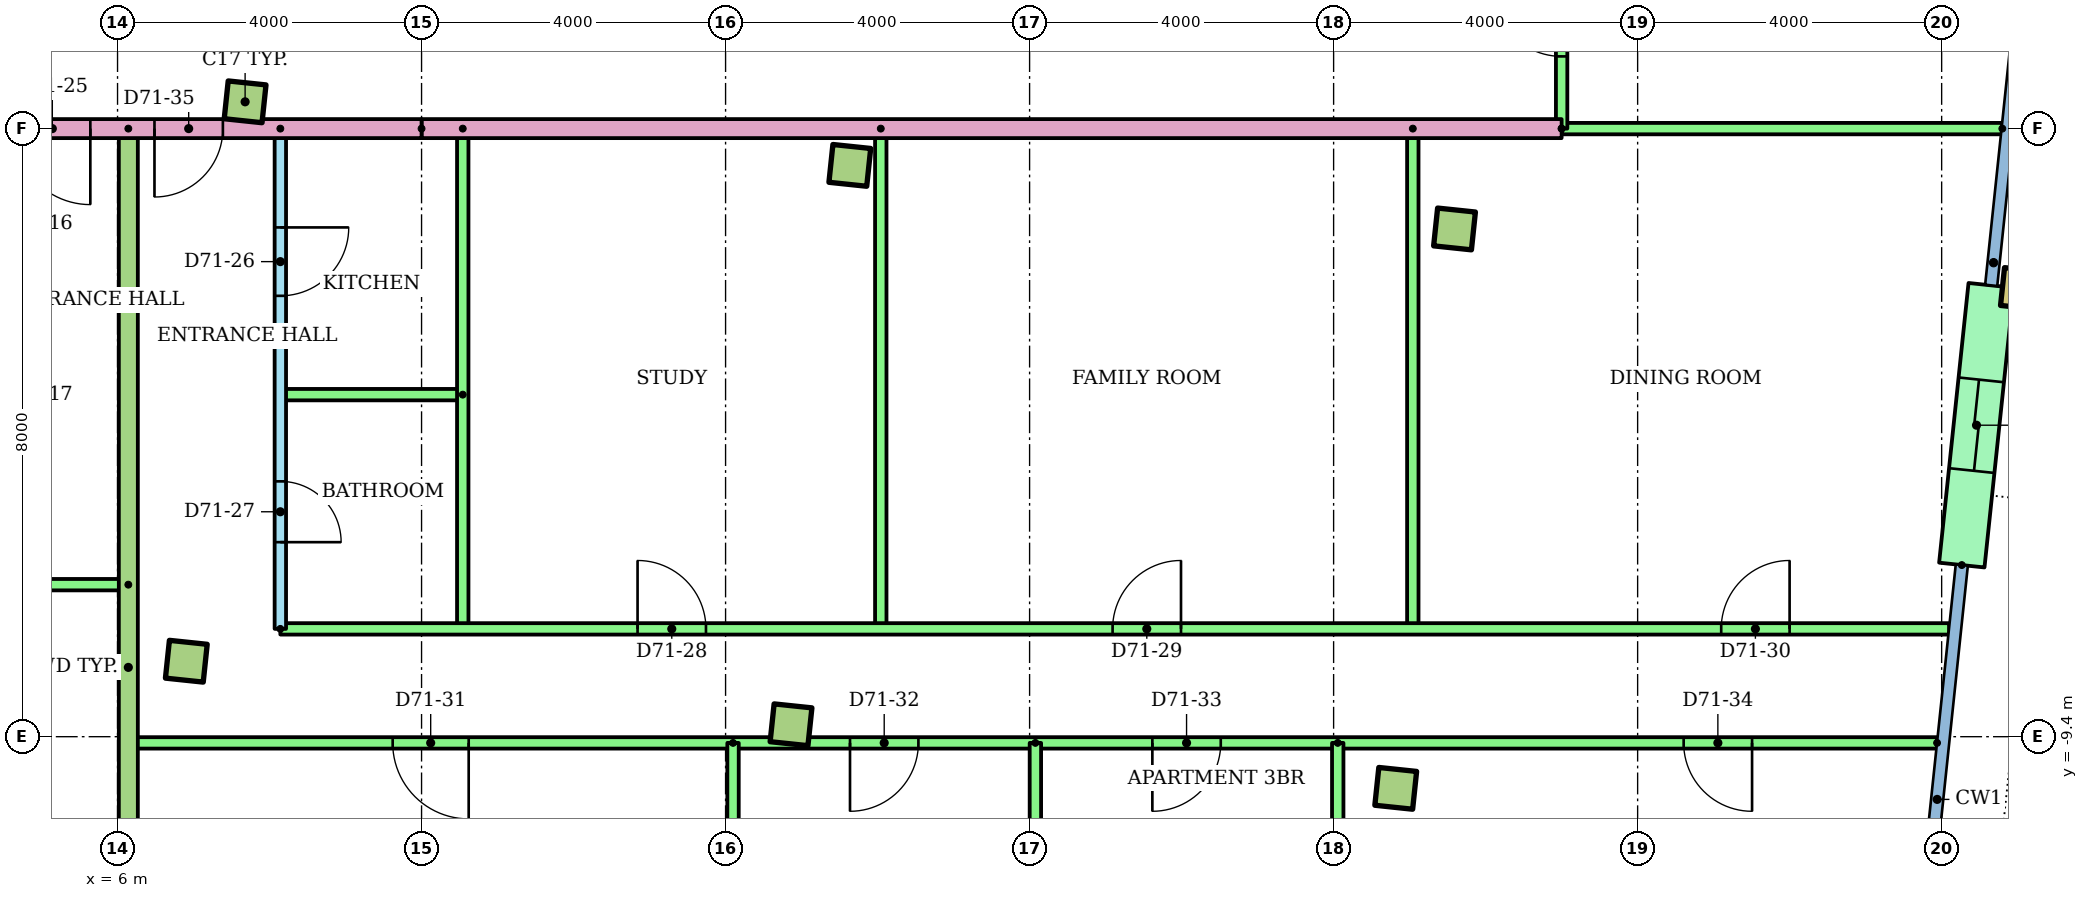
"""IFC4 building model, lengths in metres.
Left out: names, types, materials, properties, quantities, classifications, styles, units other than length and angle.
Written with IfcOpenShell. Run it as: python <this file> out.ifc"""

import sys

from ifc_helpers import new_model, si_unit, direction, frame, frame_2d, origin, origin_2d, place, context, subcontext, project, spatial, rectangle, hollow_rectangle, extrude, element, fill, save


model = new_model("IFC4")
c1 = context("Model", 3, precision=1e-05, world=origin(), true_north=direction((0.0, 1.0)))
c2 = subcontext(c1, "Body", "Model", "MODEL_VIEW")
j1 = project(units=[si_unit("LENGTHUNIT", "METRE"), si_unit("PLANEANGLEUNIT", "RADIAN")], contexts=[c1])
p1 = place(None, origin())
s1 = spatial("IfcSite", under=j1, at=p1, CompositionType="ELEMENT")
p2 = place(p1, origin())
s2 = spatial("IfcBuilding", under=s1, at=p2, CompositionType="ELEMENT")
p3 = place(p2, frame((0.0, 0.0, 272.3)))
s3 = spatial("IfcBuildingStorey", under=s2, at=p3, CompositionType="ELEMENT", Elevation=272.3)
for number, where, z_axis, x_axis in (
    (1, (6.905, -8.407, 0.0), (0.0, 0.0, 1.0), (0.995, -0.105, 0.0)),
    (2, (14.861, -9.243, 0.0), (0.0, 0.0, 1.0), (0.995, -0.105, 0.0)),
    (3, (22.817, -10.08, 0.0), (0.0, 0.0, 1.0), (0.995, -0.105, 0.0)),
    (4, (7.678, -1.048, 0.0), (0.0, 0.0, 1.0), (0.995, -0.105, 0.0)),
    (5, (15.635, -1.884, 0.0), (0.0, 0.0, 1.0), (0.995, -0.105, 0.0)),
    (6, (23.591, -2.72, 0.0), (0.0, 0.0, 1.0), (0.995, -0.105, 0.0)),
):
    element("IfcColumn", number, at=place(p3, frame(where, z_axis=z_axis, x_axis=x_axis)), inside=s3, PredefinedType="COLUMN", context=c2, shape_type="SweptSolid", body=[
        extrude(rectangle(XDim=0.5, YDim=0.5, at=origin_2d()), origin(), (0.0, 0.0, 1.0), 3.2),
    ])
p4 = place(p3, frame((31.05, -3.504, 0.0), z_axis=(0.0, 0.0, 1.0), x_axis=(0.994521895368, -0.104528463268, 0.0)))
e7 = element("IfcColumn", 7, at=p4, inside=s3, PredefinedType="COLUMN", context=c2, shape_type="SweptSolid", body=[
    extrude(hollow_rectangle(XDim=0.5, YDim=0.5, WallThickness=0.025, at=origin_2d()), origin(), (0.0, 0.0, 1.0), 3.2),
])
p5 = place(p3, frame((30.265, -7.142, 0.0), z_axis=(0.0, 0.0, 1.0), x_axis=(0.104513052986, 0.994523514933, 0.0)))
e8 = element("IfcWall", 8, at=p5, inside=s3, PredefinedType="STANDARD", context=c2, shape_type="SweptSolid", body=[
    extrude(rectangle(XDim=3.7, YDim=0.6, at=frame_2d((1.85, 0.0))), origin(), (0.0, 0.0, 1.0), 2.92),
])
p6 = place(p5, frame((1.25, 0.0, 0.0)))
e9 = element("IfcOpeningElement", 9, at=p6, cuts=e8, PredefinedType="OPENING", context=c2, shape_type="SweptSolid", body=[
    extrude(rectangle(XDim=1.2, YDim=2.1, at=frame_2d((0.6, 1.05))), frame((0.0, 0.31, 0.0), z_axis=(0.0, -1.0, 0.0), x_axis=(1.0, 0.0, 0.0)), (0.0, 0.0, 1.0), 0.62),
])
p7 = place(p3, frame((6.142, -7.4, 0.0), z_axis=(0.0, 0.0, 1.0), x_axis=(-1.0, 0.0, 0.0)))
e10 = element("IfcWall", 10, at=p7, inside=s3, PredefinedType="PARTITIONING", context=c2, shape_type="SweptSolid", body=[
    extrude(rectangle(XDim=15.912, YDim=0.15, at=frame_2d((7.956, 0.0))), origin(), (0.0, 0.0, 1.0), 2.4),
])
p8 = place(p7, frame((12.252, 0.0, 0.0)))
e11 = element("IfcOpeningElement", 11, at=p8, cuts=e10, PredefinedType="OPENING", context=c2, shape_type="SweptSolid", body=[
    extrude(rectangle(XDim=0.9, YDim=2.1, at=frame_2d((0.45, 1.05))), frame((0.0, 0.085, 0.0), z_axis=(0.0, -1.0, 0.0), x_axis=(1.0, 0.0, 0.0)), (0.0, 0.0, 1.0), 0.17),
])
p9 = place(p7, frame((9.495, 0.0, 0.0)))
e12 = element("IfcOpeningElement", 12, at=p9, cuts=e10, PredefinedType="OPENING", context=c2, shape_type="SweptSolid", body=[
    extrude(rectangle(XDim=0.9, YDim=2.1, at=frame_2d((0.45, 1.05))), frame((0.0, 0.085, 0.0), z_axis=(0.0, -1.0, 0.0), x_axis=(1.0, 0.0, 0.0)), (0.0, 0.0, 1.0), 0.17),
])
p10 = place(p7, frame((3.478, 0.0, 0.0)))
e13 = element("IfcOpeningElement", 13, at=p10, cuts=e10, PredefinedType="OPENING", context=c2, shape_type="SweptSolid", body=[
    extrude(rectangle(XDim=1.0, YDim=2.1, at=frame_2d((0.5, 1.05))), frame((0.0, 0.085, 0.0), z_axis=(0.0, -1.0, 0.0), x_axis=(1.0, 0.0, 0.0)), (0.0, 0.0, 1.0), 0.17),
])
p11 = place(p3, frame((8.142, -1.4, 0.0), z_axis=(0.0, 0.0, 1.0), x_axis=(0.0, -1.0, 0.0)))
e14 = element("IfcWall", 14, at=p11, inside=s3, PredefinedType="PARTITIONING", context=c2, shape_type="SweptSolid", body=[
    extrude(rectangle(XDim=6.582, YDim=0.15, at=frame_2d((3.291, 0.0))), origin(), (0.0, 0.0, 1.0), 2.4),
])
p12 = place(p11, frame((1.3, 0.0, 0.0)))
e15 = element("IfcOpeningElement", 15, at=p12, cuts=e14, PredefinedType="OPENING", context=c2, shape_type="SweptSolid", body=[
    extrude(rectangle(XDim=0.9, YDim=2.1, at=frame_2d((0.45, 1.05))), frame((0.0, 0.085, 0.0), z_axis=(0.0, -1.0, 0.0), x_axis=(1.0, 0.0, 0.0)), (0.0, 0.0, 1.0), 0.17),
])
p13 = place(p11, frame((4.641, 0.0, 0.0)))
e16 = element("IfcOpeningElement", 16, at=p13, cuts=e14, PredefinedType="OPENING", context=c2, shape_type="SweptSolid", body=[
    extrude(rectangle(XDim=0.8, YDim=2.1, at=frame_2d((0.4, 1.05))), frame((0.0, 0.085, 0.0), z_axis=(0.0, -1.0, 0.0), x_axis=(1.0, 0.0, 0.0)), (0.0, 0.0, 1.0), 0.17),
])
p14 = place(p3, frame((10.542, -4.9, 0.0), z_axis=(0.0, 0.0, 1.0), x_axis=(-1.0, 0.0, 0.0)))
e17 = element("IfcWall", 17, at=p14, inside=s3, PredefinedType="PARTITIONING", context=c2, shape_type="SweptSolid", body=[
    extrude(rectangle(XDim=2.4, YDim=0.15, at=frame_2d((1.2, 0.0))), origin(), (0.0, 0.0, 1.0), 2.4),
])
for number, where, z_axis, x_axis in (
    (18, (10.542, -1.4, 0.0), (0.0, 0.0, 1.0), (0.0, -1.0, 0.0)),
    (19, (16.042, -1.4, 0.0), (0.0, 0.0, 1.0), (0.0, -1.0, 0.0)),
    (20, (23.042, -1.4, 0.0), (0.0, 0.0, 1.0), (0.0, -1.0, 0.0)),
):
    element("IfcWall", number, at=place(p3, frame(where, z_axis=z_axis, x_axis=x_axis)), inside=s3, PredefinedType="PARTITIONING", context=c2, shape_type="SweptSolid", body=[
        extrude(rectangle(XDim=6.582, YDim=0.15, at=frame_2d((3.291, 0.0))), origin(), (0.0, 0.0, 1.0), 2.4),
    ])
p15 = place(p3, frame((8.142, -7.982, 0.0)))
e21 = element("IfcWall", 21, at=p15, inside=s3, PredefinedType="PARTITIONING", context=c2, shape_type="SweptSolid", body=[
    extrude(rectangle(XDim=21.955, YDim=0.15, at=frame_2d((10.978, 0.0))), origin(), (0.0, 0.0, 1.0), 2.4),
])
p16 = place(p15, frame((4.7, 0.0, 0.0)))
e22 = element("IfcOpeningElement", 22, at=p16, cuts=e21, PredefinedType="OPENING", context=c2, shape_type="SweptSolid", body=[
    extrude(rectangle(XDim=0.9, YDim=2.1, at=frame_2d((0.45, 1.05))), frame((0.0, 0.085, 0.0), z_axis=(0.0, -1.0, 0.0), x_axis=(1.0, 0.0, 0.0)), (0.0, 0.0, 1.0), 0.17),
])
p17 = place(p15, frame((10.95, 0.0, 0.0)))
e23 = element("IfcOpeningElement", 23, at=p17, cuts=e21, PredefinedType="OPENING", context=c2, shape_type="SweptSolid", body=[
    extrude(rectangle(XDim=0.9, YDim=2.1, at=frame_2d((0.45, 1.05))), frame((0.0, 0.085, 0.0), z_axis=(0.0, -1.0, 0.0), x_axis=(1.0, 0.0, 0.0)), (0.0, 0.0, 1.0), 0.17),
])
p18 = place(p15, frame((18.958, 0.0, 0.0)))
e24 = element("IfcOpeningElement", 24, at=p18, cuts=e21, PredefinedType="OPENING", context=c2, shape_type="SweptSolid", body=[
    extrude(rectangle(XDim=0.9, YDim=2.1, at=frame_2d((0.45, 1.05))), frame((0.0, 0.085, 0.0), z_axis=(0.0, -1.0, 0.0), x_axis=(1.0, 0.0, 0.0)), (0.0, 0.0, 1.0), 0.17),
])
p19 = place(p3, frame((29.94, -9.482, 0.0), z_axis=(0.0, 0.0, 1.0), x_axis=(-1.0, 0.0, 0.0)))
e25 = element("IfcWall", 25, at=p19, inside=s3, PredefinedType="PARTITIONING", context=c2, shape_type="SweptSolid", body=[
    extrude(rectangle(XDim=23.798, YDim=0.15, at=frame_2d((11.899, 0.0))), origin(), (0.0, 0.0, 1.0), 2.4),
])
p20 = place(p19, frame((19.32, 0.0, 0.0)))
e26 = element("IfcOpeningElement", 26, at=p20, cuts=e25, PredefinedType="OPENING", context=c2, shape_type="SweptSolid", body=[
    extrude(rectangle(XDim=1.0, YDim=2.1, at=frame_2d((0.5, 1.05))), frame((0.0, 0.085, 0.0), z_axis=(0.0, -1.0, 0.0), x_axis=(1.0, 0.0, 0.0)), (0.0, 0.0, 1.0), 0.17),
])
p21 = place(p19, frame((13.403, 0.0, 0.0)))
e27 = element("IfcOpeningElement", 27, at=p21, cuts=e25, PredefinedType="OPENING", context=c2, shape_type="SweptSolid", body=[
    extrude(rectangle(XDim=0.9, YDim=2.1, at=frame_2d((0.45, 1.05))), frame((0.0, 0.085, 0.0), z_axis=(0.0, -1.0, 0.0), x_axis=(1.0, 0.0, 0.0)), (0.0, 0.0, 1.0), 0.17),
])
p22 = place(p19, frame((9.425, 0.0, 0.0)))
e28 = element("IfcOpeningElement", 28, at=p22, cuts=e25, PredefinedType="OPENING", context=c2, shape_type="SweptSolid", body=[
    extrude(rectangle(XDim=0.9, YDim=2.1, at=frame_2d((0.45, 1.05))), frame((0.0, 0.085, 0.0), z_axis=(0.0, -1.0, 0.0), x_axis=(1.0, 0.0, 0.0)), (0.0, 0.0, 1.0), 0.17),
])
p23 = place(p19, frame((2.434, 0.0, 0.0)))
e29 = element("IfcOpeningElement", 29, at=p23, cuts=e25, PredefinedType="OPENING", context=c2, shape_type="SweptSolid", body=[
    extrude(rectangle(XDim=0.9, YDim=2.1, at=frame_2d((0.45, 1.05))), frame((0.0, 0.085, 0.0), z_axis=(0.0, -1.0, 0.0), x_axis=(1.0, 0.0, 0.0)), (0.0, 0.0, 1.0), 0.17),
])
p24 = place(p3, frame((14.098, -9.482, 0.0), z_axis=(0.0, 0.0, 1.0), x_axis=(0.0, -1.0, 0.0)))
e30 = element("IfcWall", 30, at=p24, inside=s3, PredefinedType="PARTITIONING", context=c2, shape_type="SweptSolid", body=[
    extrude(rectangle(XDim=6.931, YDim=0.15, at=frame_2d((3.466, 0.0))), origin(), (0.0, 0.0, 1.0), 2.4),
])
p25 = place(p3, frame((18.076, -9.482, 0.0), z_axis=(0.0, 0.0, 1.0), x_axis=(0.0, -1.0, 0.0)))
e31 = element("IfcWall", 31, at=p25, inside=s3, PredefinedType="PARTITIONING", context=c2, shape_type="SweptSolid", body=[
    extrude(rectangle(XDim=7.36, YDim=0.15, at=frame_2d((3.68, 0.0))), origin(), (0.0, 0.0, 1.0), 2.4),
])
p26 = place(p3, frame((22.054, -9.482, 0.0), z_axis=(0.0, 0.0, 1.0), x_axis=(0.0, -1.0, 0.0)))
e32 = element("IfcWall", 32, at=p26, inside=s3, PredefinedType="PARTITIONING", context=c2, shape_type="SweptSolid", body=[
    extrude(rectangle(XDim=7.767, YDim=0.15, at=frame_2d((3.884, 0.0))), origin(), (0.0, 0.0, 1.0), 2.4),
])
p27 = place(p3, frame((6.142, -1.4, 0.0), z_axis=(0.0, 0.0, 1.0), x_axis=(0.0, -1.0, 0.0)))
e33 = element("IfcWall", 33, at=p27, inside=s3, PredefinedType="PARTITIONING", context=c2, shape_type="SweptSolid", body=[
    extrude(rectangle(XDim=14.177, YDim=0.25, at=frame_2d((7.088, 0.0))), origin(), (0.0, 0.0, 1.0), 2.4),
])
p28 = place(p3, frame((25.0, -1.4, 0.0), z_axis=(0.0, 0.0, 1.0), x_axis=(-1.0, 0.0, 0.0)))
e34 = element("IfcWall", 34, at=p28, inside=s3, PredefinedType="PARTITIONING", context=c2, shape_type="SweptSolid", body=[
    extrude(rectangle(XDim=15.0, YDim=0.25, at=frame_2d((7.5, 0.0))), origin(), (0.0, 0.0, 1.0), 2.4),
])
p29 = place(p3, frame((30.798, -1.4, 0.0), z_axis=(0.0, 0.0, 1.0), x_axis=(-1.0, 0.0, 0.0)))
e35 = element("IfcWall", 35, at=p29, inside=s3, PredefinedType="PARTITIONING", context=c2, shape_type="SweptSolid", body=[
    extrude(rectangle(XDim=5.798, YDim=0.15, at=frame_2d((2.899, 0.0))), origin(), (0.0, 0.0, 1.0), 2.4),
])
p30 = place(p3, frame((25.0, -1.4, 0.0), z_axis=(0.0, 0.0, 1.0), x_axis=(0.0, 1.0, 0.0)))
e36 = element("IfcWall", 36, at=p30, inside=s3, PredefinedType="PARTITIONING", context=c2, shape_type="SweptSolid", body=[
    extrude(rectangle(XDim=2.8, YDim=0.15, at=frame_2d((1.4, 0.0))), origin(), (0.0, 0.0, 1.0), 2.4),
])
p31 = place(p30, frame((0.95, 0.0, 0.0)))
e37 = element("IfcOpeningElement", 37, at=p31, cuts=e36, PredefinedType="OPENING", context=c2, shape_type="SweptSolid", body=[
    extrude(rectangle(XDim=0.9, YDim=2.1, at=frame_2d((0.45, 1.05))), frame((0.0, 0.085, 0.0), z_axis=(0.0, -1.0, 0.0), x_axis=(1.0, 0.0, 0.0)), (0.0, 0.0, 1.0), 0.17),
])
p32 = place(p3, frame((10.0, -1.4, 0.0), z_axis=(0.0, 0.0, 1.0), x_axis=(-1.0, 0.0, 0.0)))
e38 = element("IfcWall", 38, at=p32, inside=s3, PredefinedType="PARTITIONING", context=c2, shape_type="SweptSolid", body=[
    extrude(rectangle(XDim=20.0, YDim=0.25, at=frame_2d((10.0, 0.0))), origin(), (0.0, 0.0, 1.0), 2.4),
])
p33 = place(p32, frame((4.358, 0.0, 0.0)))
e39 = element("IfcOpeningElement", 39, at=p33, cuts=e38, PredefinedType="OPENING", context=c2, shape_type="SweptSolid", body=[
    extrude(rectangle(XDim=1.0, YDim=2.1, at=frame_2d((0.5, 1.05))), frame((0.0, 0.135, 0.0), z_axis=(0.0, -1.0, 0.0), x_axis=(1.0, 0.0, 0.0)), (0.0, 0.0, 1.0), 0.27),
])
p34 = place(p32, frame((2.614, 0.0, 0.0)))
e40 = element("IfcOpeningElement", 40, at=p34, cuts=e38, PredefinedType="OPENING", context=c2, shape_type="SweptSolid", body=[
    extrude(rectangle(XDim=0.9, YDim=2.1, at=frame_2d((0.45, 1.05))), frame((0.0, 0.135, 0.0), z_axis=(0.0, -1.0, 0.0), x_axis=(1.0, 0.0, 0.0)), (0.0, 0.0, 1.0), 0.27),
])
p35 = place(p33, origin())
e41 = element("IfcDoor", 41, at=p35, inside=s3, OperationType="SINGLE_SWING_LEFT", PredefinedType="DOOR", context=c2, shape_type="SweptSolid", body=[
    extrude(rectangle(XDim=1.0, YDim=2.1, at=frame_2d((0.5, 1.05))), frame((0.0, 0.025, 0.0), z_axis=(0.0, -1.0, 0.0), x_axis=(1.0, 0.0, 0.0)), (0.0, 0.0, 1.0), 0.05),
])
fill(e39, e41)
p36 = place(p12, origin())
e42 = element("IfcDoor", 42, at=p36, inside=s3, OperationType="SINGLE_SWING_LEFT", PredefinedType="DOOR", context=c2, shape_type="SweptSolid", body=[
    extrude(rectangle(XDim=0.9, YDim=2.1, at=frame_2d((0.45, 1.05))), frame((0.0, 0.025, 0.0), z_axis=(0.0, -1.0, 0.0), x_axis=(1.0, 0.0, 0.0)), (0.0, 0.0, 1.0), 0.05),
])
fill(e15, e42)
p37 = place(p13, origin())
e43 = element("IfcDoor", 43, at=p37, inside=s3, OperationType="SINGLE_SWING_RIGHT", PredefinedType="DOOR", context=c2, shape_type="SweptSolid", body=[
    extrude(rectangle(XDim=0.8, YDim=2.1, at=frame_2d((0.4, 1.05))), frame((0.0, 0.025, 0.0), z_axis=(0.0, -1.0, 0.0), x_axis=(1.0, 0.0, 0.0)), (0.0, 0.0, 1.0), 0.05),
])
fill(e16, e43)
p38 = place(p16, origin())
e44 = element("IfcDoor", 44, at=p38, inside=s3, OperationType="SINGLE_SWING_LEFT", PredefinedType="DOOR", context=c2, shape_type="SweptSolid", body=[
    extrude(rectangle(XDim=0.9, YDim=2.1, at=frame_2d((0.45, 1.05))), frame((0.0, 0.025, 0.0), z_axis=(0.0, -1.0, 0.0), x_axis=(1.0, 0.0, 0.0)), (0.0, 0.0, 1.0), 0.05),
])
fill(e22, e44)
p39 = place(p17, origin())
e45 = element("IfcDoor", 45, at=p39, inside=s3, OperationType="SINGLE_SWING_RIGHT", PredefinedType="DOOR", context=c2, shape_type="SweptSolid", body=[
    extrude(rectangle(XDim=0.9, YDim=2.1, at=frame_2d((0.45, 1.05))), frame((0.0, 0.025, 0.0), z_axis=(0.0, -1.0, 0.0), x_axis=(1.0, 0.0, 0.0)), (0.0, 0.0, 1.0), 0.05),
])
fill(e23, e45)
p40 = place(p18, origin())
e46 = element("IfcDoor", 46, at=p40, inside=s3, OperationType="SINGLE_SWING_RIGHT", PredefinedType="DOOR", context=c2, shape_type="SweptSolid", body=[
    extrude(rectangle(XDim=0.9, YDim=2.1, at=frame_2d((0.45, 1.05))), frame((0.0, 0.025, 0.0), z_axis=(0.0, -1.0, 0.0), x_axis=(1.0, 0.0, 0.0)), (0.0, 0.0, 1.0), 0.05),
])
fill(e24, e46)
p41 = place(p20, origin())
e47 = element("IfcDoor", 47, at=p41, inside=s3, OperationType="SINGLE_SWING_LEFT", PredefinedType="DOOR", context=c2, shape_type="SweptSolid", body=[
    extrude(rectangle(XDim=1.0, YDim=2.1, at=frame_2d((0.5, 1.05))), frame((0.0, 0.025, 0.0), z_axis=(0.0, -1.0, 0.0), x_axis=(1.0, 0.0, 0.0)), (0.0, 0.0, 1.0), 0.05),
])
fill(e26, e47)
p42 = place(p21, origin())
e48 = element("IfcDoor", 48, at=p42, inside=s3, OperationType="SINGLE_SWING_RIGHT", PredefinedType="DOOR", context=c2, shape_type="SweptSolid", body=[
    extrude(rectangle(XDim=0.9, YDim=2.1, at=frame_2d((0.45, 1.05))), frame((0.0, 0.025, 0.0), z_axis=(0.0, -1.0, 0.0), x_axis=(1.0, 0.0, 0.0)), (0.0, 0.0, 1.0), 0.05),
])
fill(e27, e48)
p43 = place(p22, origin())
e49 = element("IfcDoor", 49, at=p43, inside=s3, OperationType="SINGLE_SWING_RIGHT", PredefinedType="DOOR", context=c2, shape_type="SweptSolid", body=[
    extrude(rectangle(XDim=0.9, YDim=2.1, at=frame_2d((0.45, 1.05))), frame((0.0, 0.025, 0.0), z_axis=(0.0, -1.0, 0.0), x_axis=(1.0, 0.0, 0.0)), (0.0, 0.0, 1.0), 0.05),
])
fill(e28, e49)
p44 = place(p23, origin())
e50 = element("IfcDoor", 50, at=p44, inside=s3, OperationType="SINGLE_SWING_LEFT", PredefinedType="DOOR", context=c2, shape_type="SweptSolid", body=[
    extrude(rectangle(XDim=0.9, YDim=2.1, at=frame_2d((0.45, 1.05))), frame((0.0, 0.025, 0.0), z_axis=(0.0, -1.0, 0.0), x_axis=(1.0, 0.0, 0.0)), (0.0, 0.0, 1.0), 0.05),
])
fill(e29, e50)
p45 = place(p34, origin())
e51 = element("IfcDoor", 51, at=p45, inside=s3, OperationType="SINGLE_SWING_RIGHT", PredefinedType="DOOR", context=c2, shape_type="SweptSolid", body=[
    extrude(rectangle(XDim=0.9, YDim=2.1, at=frame_2d((0.45, 1.05))), frame((0.0, 0.025, 0.0), z_axis=(0.0, -1.0, 0.0), x_axis=(1.0, 0.0, 0.0)), (0.0, 0.0, 1.0), 0.05),
])
fill(e40, e51)
p46 = place(p31, origin())
e52 = element("IfcDoor", 52, at=p46, inside=s3, OperationType="SINGLE_SWING_RIGHT", PredefinedType="DOOR", context=c2, shape_type="SweptSolid", body=[
    extrude(rectangle(XDim=0.9, YDim=2.1, at=frame_2d((0.45, 1.05))), frame((0.0, 0.025, 0.0), z_axis=(0.0, -1.0, 0.0), x_axis=(1.0, 0.0, 0.0)), (0.0, 0.0, 1.0), 0.05),
])
fill(e37, e52)
p47 = place(p6, origin())
e53 = element("IfcDoor", 53, at=p47, inside=s3, OperationType="SLIDING_TO_LEFT", PredefinedType="DOOR", context=c2, shape_type="SweptSolid", body=[
    extrude(rectangle(XDim=1.2, YDim=2.1, at=frame_2d((0.6, 1.05))), frame((0.0, 0.025, 0.0), z_axis=(0.0, -1.0, 0.0), x_axis=(1.0, 0.0, 0.0)), (0.0, 0.0, 1.0), 0.05),
])
fill(e9, e53)
save(model, sys.argv[1])
